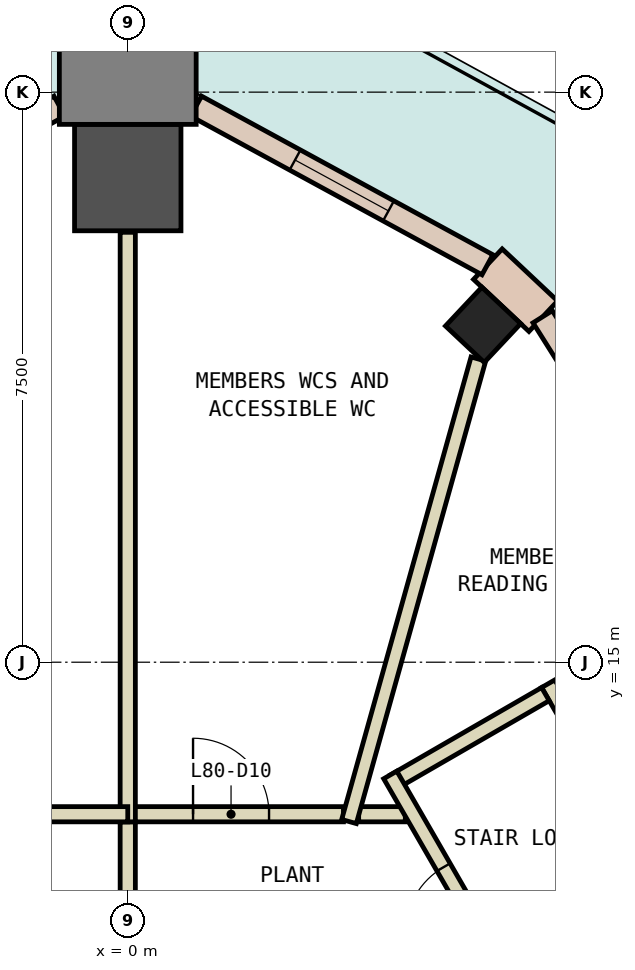
"""IFC4 building model, lengths in metres.
Left out: names, types, materials, properties, quantities, classifications, styles, units other than length and angle.
Written with IfcOpenShell. Run it as: python <this file> out.ifc"""

import sys

from ifc_helpers import new_model, si_unit, direction, frame, frame_2d, origin, origin_2d, place, context, subcontext, project, spatial, rectangle, extrude, element, fill, save


model = new_model("IFC4")
c1 = context("Model", 3, precision=1e-05, world=origin(), true_north=direction((0.0, 1.0)))
c2 = subcontext(c1, "Body", "Model", "MODEL_VIEW")
j1 = project(units=[si_unit("LENGTHUNIT", "METRE"), si_unit("PLANEANGLEUNIT", "RADIAN")], contexts=[c1])
p1 = place(None, origin())
s1 = spatial("IfcSite", under=j1, at=p1, CompositionType="ELEMENT")
p2 = place(p1, origin())
s2 = spatial("IfcBuilding", under=s1, at=p2, CompositionType="ELEMENT")
p3 = place(p2, frame((0.0, 0.0, 340.4)))
s3 = spatial("IfcBuildingStorey", under=s2, at=p3, CompositionType="ELEMENT", Elevation=340.4)
p4 = place(p3, frame((4.675, 19.439, 0.0), z_axis=(0.0, 0.0, 1.0), x_axis=(-0.728908886641, 0.684610717836, 0.0)))
e1 = element("IfcColumn", 1, at=p4, inside=s3, PredefinedType="COLUMN", context=c2, shape_type="SweptSolid", body=[
    extrude(rectangle(XDim=0.7, YDim=0.7, at=origin_2d()), origin(), (0.0, 0.0, 1.0), 4.15),
])
p5 = place(p3, frame((0.0, 21.376, 0.0), z_axis=(0.0, 0.0, 1.0), x_axis=(0.0, 1.0, 0.0)))
e2 = element("IfcColumn", 2, at=p5, inside=s3, PredefinedType="COLUMN", context=c2, shape_type="SweptSolid", body=[
    extrude(rectangle(XDim=1.4, YDim=1.4, at=origin_2d()), origin(), (0.0, 0.0, 1.0), 4.15),
])
p6 = place(p3, frame((0.0, 22.976, 0.0), z_axis=(0.0, 0.0, 1.0), x_axis=(0.0, 1.0, 0.0)))
e3 = element("IfcColumn", 3, at=p6, inside=s3, PredefinedType="COLUMN", context=c2, shape_type="SweptSolid", body=[
    extrude(rectangle(XDim=1.8, YDim=1.8, at=origin_2d()), origin(), (0.0, 0.0, 1.0), 4.15),
])
p7 = place(p3, frame((5.467, 19.552, 0.0), z_axis=(0.0, 0.0, 1.0), x_axis=(-0.728729965402, 0.684801166416, 0.0)))
e4 = element("IfcWall", 4, at=p7, inside=s3, PredefinedType="STANDARD", context=c2, shape_type="SweptSolid", body=[
    extrude(rectangle(XDim=1.0, YDim=0.55, at=frame_2d((0.5, 0.0))), origin(), (0.0, 0.0, 1.0), 4.15),
])
p8 = place(p3, frame((8.826, 14.19, 0.0), z_axis=(0.0, 0.0, 1.0), x_axis=(-0.532279831475, 0.846568473902, 0.0)))
e5 = element("IfcWall", 5, at=p8, inside=s3, PredefinedType="STANDARD", context=c2, shape_type="SweptSolid", body=[
    extrude(rectangle(XDim=6.325, YDim=0.3, at=frame_2d((3.163, 0.0))), origin(), (0.0, 0.0, 1.0), 4.15),
])
p9 = place(p8, frame((0.581, 0.0, 0.9)))
e6 = element("IfcOpeningElement", 6, at=p9, cuts=e5, PredefinedType="OPENING", context=c2, shape_type="SweptSolid", body=[
    extrude(rectangle(XDim=2.0, YDim=3.0, at=frame_2d((1.0, 1.5))), frame((0.0, 0.16, 0.0), z_axis=(0.0, -1.0, 0.0), x_axis=(1.0, 0.0, 0.0)), (0.0, 0.0, 1.0), 0.32),
])
p10 = place(p8, frame((3.744, 0.0, 0.9)))
e7 = element("IfcOpeningElement", 7, at=p10, cuts=e5, PredefinedType="OPENING", context=c2, shape_type="SweptSolid", body=[
    extrude(rectangle(XDim=2.0, YDim=3.0, at=frame_2d((1.0, 1.5))), frame((0.0, 0.16, 0.0), z_axis=(0.0, -1.0, 0.0), x_axis=(1.0, 0.0, 0.0)), (0.0, 0.0, 1.0), 0.32),
])
p11 = place(p3, frame((4.732, 20.229, 0.0), z_axis=(0.0, 0.0, 1.0), x_axis=(-0.8782630237, 0.478177855197, 0.0)))
e8 = element("IfcWall", 8, at=p11, inside=s3, PredefinedType="STANDARD", context=c2, shape_type="SweptSolid", body=[
    extrude(rectangle(XDim=4.364, YDim=0.3, at=frame_2d((2.182, 0.0))), origin(), (0.0, 0.0, 1.0), 4.15),
])
p12 = place(p11, frame((1.482, 0.0, 0.9)))
e9 = element("IfcOpeningElement", 9, at=p12, cuts=e8, PredefinedType="OPENING", context=c2, shape_type="SweptSolid", body=[
    extrude(rectangle(XDim=1.4, YDim=3.0, at=frame_2d((0.7, 1.5))), frame((0.0, 0.16, 0.0), z_axis=(0.0, -1.0, 0.0), x_axis=(1.0, 0.0, 0.0)), (0.0, 0.0, 1.0), 0.32),
])
p13 = place(p3, frame((-0.899, 22.316, 0.0), z_axis=(0.0, 0.0, 1.0), x_axis=(-0.8782630237, -0.478177855197, 0.0)))
e10 = element("IfcWall", 10, at=p13, inside=s3, PredefinedType="STANDARD", context=c2, shape_type="SweptSolid", body=[
    extrude(rectangle(XDim=4.364, YDim=0.3, at=frame_2d((2.182, 0.0))), origin(), (0.0, 0.0, 1.0), 4.15),
])
p14 = place(p13, frame((1.482, 0.0, 0.9)))
e11 = element("IfcOpeningElement", 11, at=p14, cuts=e10, PredefinedType="OPENING", context=c2, shape_type="SweptSolid", body=[
    extrude(rectangle(XDim=1.4, YDim=3.0, at=frame_2d((0.7, 1.5))), frame((0.0, 0.16, 0.0), z_axis=(0.0, -1.0, 0.0), x_axis=(1.0, 0.0, 0.0)), (0.0, 0.0, 1.0), 0.32),
])
p15 = place(p3, frame((5.532, 14.717, 0.0), z_axis=(0.0, 0.0, 1.0), x_axis=(0.499968011863, -0.866043871356, 0.0)))
e12 = element("IfcWall", 12, at=p15, inside=s3, PredefinedType="PARTITIONING", context=c2, shape_type="SweptSolid", body=[
    extrude(rectangle(XDim=7.201, YDim=0.2, at=frame_2d((3.6, 0.0))), origin(), (0.0, 0.0, 1.0), 4.15),
])
p16 = place(p15, frame((3.18, 0.0, 0.0)))
e13 = element("IfcOpeningElement", 13, at=p16, cuts=e12, PredefinedType="OPENING", context=c2, shape_type="SweptSolid", body=[
    extrude(rectangle(XDim=1.0, YDim=2.1, at=frame_2d((0.5, 1.05))), frame((0.0, 0.11, 0.0), z_axis=(0.0, -1.0, 0.0), x_axis=(1.0, 0.0, 0.0)), (0.0, 0.0, 1.0), 0.22),
])
p17 = place(p3, frame((3.504, 13.43, 0.0), z_axis=(0.0, 0.0, 1.0), x_axis=(0.865927408828, 0.500169693844, 0.0)))
e14 = element("IfcWall", 14, at=p17, inside=s3, PredefinedType="PARTITIONING", context=c2, shape_type="SweptSolid", body=[
    extrude(rectangle(XDim=2.3, YDim=0.2, at=frame_2d((1.15, 0.0))), origin(), (0.0, 0.0, 1.0), 4.15),
])
p18 = place(p3, frame((3.038, 13.0, 0.0), z_axis=(0.0, 0.0, 1.0), x_axis=(1.0, 0.0, 0.0)))
e15 = element("IfcWall", 15, at=p18, inside=s3, PredefinedType="PARTITIONING", context=c2, shape_type="SweptSolid", body=[
    extrude(rectangle(XDim=0.614, YDim=0.2, at=frame_2d((0.307, 0.0))), origin(), (0.0, 0.0, 1.0), 4.15),
])
p19 = place(p3, frame((0.0, 13.0, 0.0), z_axis=(0.0, 0.0, 1.0), x_axis=(1.0, 0.0, 0.0)))
e16 = element("IfcWall", 16, at=p19, inside=s3, PredefinedType="PARTITIONING", context=c2, shape_type="SweptSolid", body=[
    extrude(rectangle(XDim=2.838, YDim=0.2, at=frame_2d((1.419, 0.0))), origin(), (0.0, 0.0, 1.0), 4.15),
])
p20 = place(p19, frame((0.859, 0.0, 0.0)))
e17 = element("IfcOpeningElement", 17, at=p20, cuts=e16, PredefinedType="OPENING", context=c2, shape_type="SweptSolid", body=[
    extrude(rectangle(XDim=1.0, YDim=2.1, at=frame_2d((0.5, 1.05))), frame((0.0, 0.11, 0.0), z_axis=(0.0, -1.0, 0.0), x_axis=(1.0, 0.0, 0.0)), (0.0, 0.0, 1.0), 0.22),
])
p21 = place(p3, frame((0.0, 11.0, 0.0), z_axis=(0.0, 0.0, 1.0), x_axis=(0.0, 1.0, 0.0)))
e18 = element("IfcWall", 18, at=p21, inside=s3, PredefinedType="PARTITIONING", context=c2, shape_type="SweptSolid", body=[
    extrude(rectangle(XDim=1.9, YDim=0.2, at=frame_2d((0.95, 0.0))), origin(), (0.0, 0.0, 1.0), 4.15),
])
p22 = place(p3, frame((2.911, 12.904, 0.0), z_axis=(0.0, 0.0, 1.0), x_axis=(0.269389141698, 0.963031406723, 0.0)))
e19 = element("IfcWall", 19, at=p22, inside=s3, PredefinedType="PARTITIONING", context=c2, shape_type="SweptSolid", body=[
    extrude(rectangle(XDim=6.319, YDim=0.2, at=frame_2d((3.159, 0.0))), origin(), (0.0, 0.0, 1.0), 4.15),
])
p23 = place(p3, frame((0.0, 12.9, 0.0), z_axis=(0.0, 0.0, 1.0), x_axis=(0.0, 1.0, 0.0)))
e20 = element("IfcWall", 20, at=p23, inside=s3, PredefinedType="PARTITIONING", context=c2, shape_type="SweptSolid", body=[
    extrude(rectangle(XDim=7.756, YDim=0.2, at=frame_2d((3.878, 0.0))), origin(), (0.0, 0.0, 1.0), 4.15),
])
p24 = place(p3, frame((-5.962, 13.0, 0.0), z_axis=(0.0, 0.0, 1.0), x_axis=(1.0, 0.0, 0.0)))
e21 = element("IfcWall", 21, at=p24, inside=s3, PredefinedType="PARTITIONING", context=c2, shape_type="SweptSolid", body=[
    extrude(rectangle(XDim=5.962, YDim=0.2, at=frame_2d((2.981, 0.0))), origin(), (0.0, 0.0, 1.0), 4.15),
])
p25 = place(p3, frame((4.822, 11.147, 0.0), z_axis=(0.0, 0.0, 1.0), x_axis=(-0.499871764879, 0.866099427708, 0.0)))
e22 = element("IfcWall", 22, at=p25, inside=s3, PredefinedType="PARTITIONING", context=c2, shape_type="SweptSolid", body=[
    extrude(rectangle(XDim=2.737, YDim=0.2, at=frame_2d((1.368, 0.0))), origin(), (0.0, 0.0, 1.0), 4.15),
])
p26 = place(p25, frame((0.335, 0.0, 0.0)))
e23 = element("IfcOpeningElement", 23, at=p26, cuts=e22, PredefinedType="OPENING", context=c2, shape_type="SweptSolid", body=[
    extrude(rectangle(XDim=1.0, YDim=2.1, at=frame_2d((0.5, 1.05))), frame((0.0, 0.11, 0.0), z_axis=(0.0, -1.0, 0.0), x_axis=(1.0, 0.0, 0.0)), (0.0, 0.0, 1.0), 0.22),
])
p27 = place(p12, origin())
e24 = element("IfcWindow", 24, at=p27, inside=s3, PartitioningType="SINGLE_PANEL", PredefinedType="WINDOW", context=c2, shape_type="SweptSolid", body=[
    extrude(rectangle(XDim=1.4, YDim=3.0, at=frame_2d((0.7, 1.5))), frame((0.0, 0.03, 0.0), z_axis=(0.0, -1.0, 0.0), x_axis=(1.0, 0.0, 0.0)), (0.0, 0.0, 1.0), 0.06),
])
fill(e9, e24)
p28 = place(p26, origin())
e25 = element("IfcDoor", 25, at=p28, inside=s3, OperationType="SINGLE_SWING_RIGHT", PredefinedType="DOOR", context=c2, shape_type="SweptSolid", body=[
    extrude(rectangle(XDim=1.0, YDim=2.1, at=frame_2d((0.5, 1.05))), frame((0.0, 0.025, 0.0), z_axis=(0.0, -1.0, 0.0), x_axis=(1.0, 0.0, 0.0)), (0.0, 0.0, 1.0), 0.05),
])
fill(e23, e25)
p29 = place(p20, origin())
e26 = element("IfcDoor", 26, at=p29, inside=s3, OperationType="SINGLE_SWING_LEFT", PredefinedType="DOOR", context=c2, shape_type="SweptSolid", body=[
    extrude(rectangle(XDim=1.0, YDim=2.1, at=frame_2d((0.5, 1.05))), frame((0.0, 0.025, 0.0), z_axis=(0.0, -1.0, 0.0), x_axis=(1.0, 0.0, 0.0)), (0.0, 0.0, 1.0), 0.05),
])
fill(e17, e26)
save(model, sys.argv[1])
